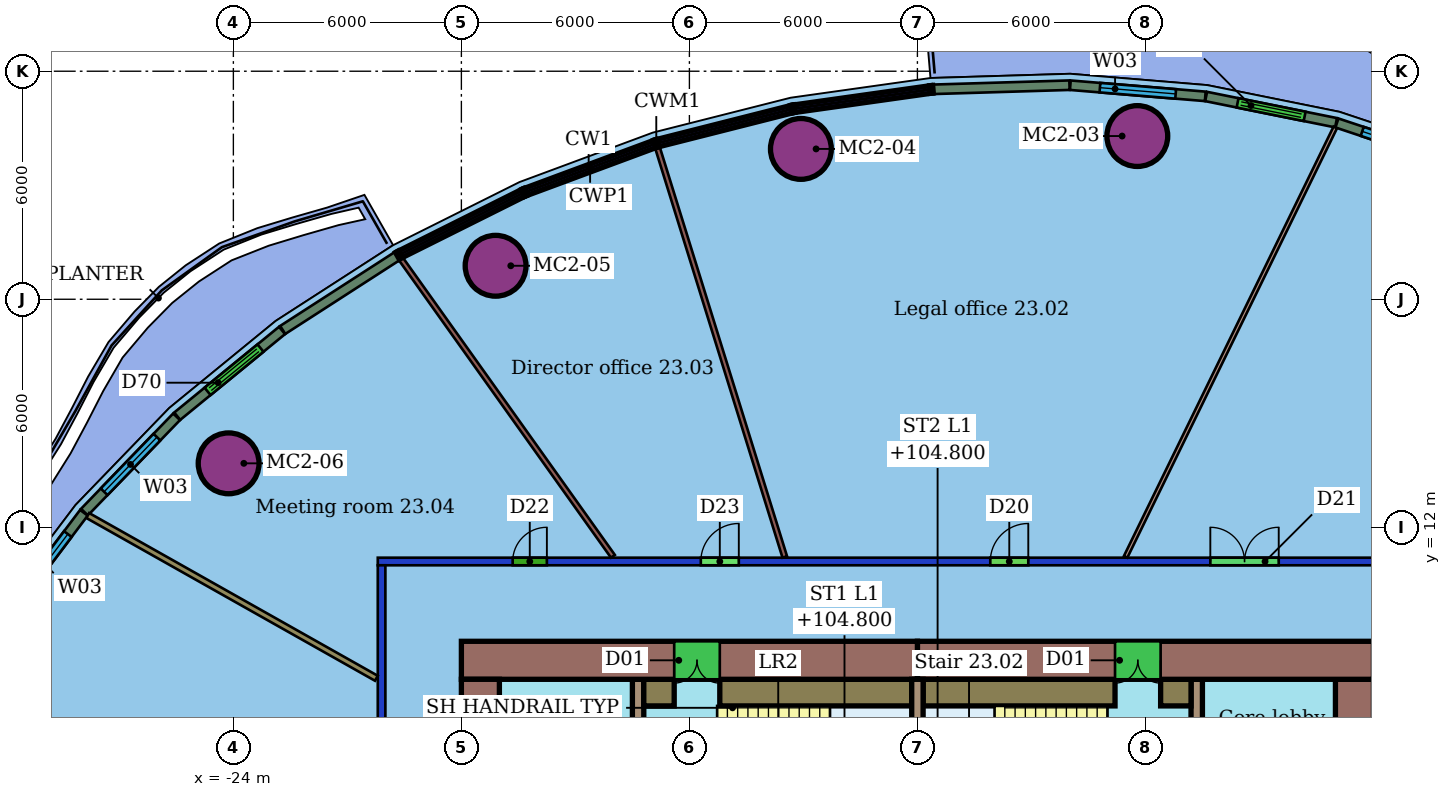
"""IFC4 building model, lengths in metres.
Left out: names, types, materials, properties, quantities, classifications, styles, units other than length and angle.
Written with IfcOpenShell. Run it as: python <this file> out.ifc"""

import sys

from ifc_helpers import new_model, si_unit, direction, frame, frame_2d, origin, origin_2d, place, context, subcontext, project, spatial, rectangle, hollow_circle, extrude, element, fill, save


model = new_model("IFC4")
c1 = context("Model", 3, precision=1e-05, world=origin(), true_north=direction((0.0, 1.0)))
c2 = subcontext(c1, "Body", "Model", "MODEL_VIEW")
j1 = project(units=[si_unit("LENGTHUNIT", "METRE"), si_unit("PLANEANGLEUNIT", "RADIAN")], contexts=[c1])
p1 = place(None, origin())
s1 = spatial("IfcSite", under=j1, at=p1, CompositionType="ELEMENT")
p2 = place(p1, origin())
s2 = spatial("IfcBuilding", under=s1, at=p2, CompositionType="ELEMENT")
p3 = place(p2, frame((0.0, 0.0, 103.0)))
s3 = spatial("IfcBuildingStorey", under=s2, at=p3, CompositionType="ELEMENT", Elevation=103.0)
for number, where, z_axis, x_axis in (
    (1, (-0.213, 22.294, 0.0), (0.0, 0.0, 1.0), (1.0, 0.0, 0.0)),
    (2, (-9.066, 21.956, 0.0), (0.0, 0.0, 1.0), (1.0, 0.0, 0.0)),
    (3, (-17.1, 18.881, 0.0), (0.0, 0.0, 1.0), (1.0, 0.0, 0.0)),
    (4, (-24.125, 13.683, 0.0), (0.0, 0.0, 1.0), (1.0, 0.0, 0.0)),
):
    element("IfcColumn", number, at=place(p3, frame(where, z_axis=z_axis, x_axis=x_axis)), inside=s3, PredefinedType="COLUMN", context=c2, shape_type="SweptSolid", body=[
        extrude(hollow_circle(Radius=0.8, WallThickness=0.055, at=origin_2d()), origin(), (0.0, 0.0, 1.0), 3.45),
    ])
p4 = place(p3, frame((-20.1, -11.0, 0.0), z_axis=(0.0, 0.0, 1.0), x_axis=(0.0, 1.0, 0.0)))
e5 = element("IfcWall", 5, at=p4, inside=s3, PredefinedType="PARTITIONING", context=c2, shape_type="SweptSolid", body=[
    extrude(rectangle(XDim=22.0, YDim=0.2, at=frame_2d((11.0, 0.0))), origin(), (0.0, 0.0, 1.0), 3.0),
])
p5 = place(p4, frame((15.485, 0.0, 0.0)))
e6 = element("IfcOpeningElement", 6, at=p5, cuts=e5, PredefinedType="OPENING", context=c2, shape_type="SweptSolid", body=[
    extrude(rectangle(XDim=1.5, YDim=2.1, at=frame_2d((0.75, 1.05))), frame((0.0, 0.11, 0.0), z_axis=(0.0, -1.0, 0.0), x_axis=(1.0, 0.0, 0.0)), (0.0, 0.0, 1.0), 0.22),
])
p6 = place(p4, frame((9.038, 0.0, 0.0)))
e7 = element("IfcOpeningElement", 7, at=p6, cuts=e5, PredefinedType="OPENING", context=c2, shape_type="SweptSolid", body=[
    extrude(rectangle(XDim=0.9, YDim=2.1, at=frame_2d((0.45, 1.05))), frame((0.0, 0.11, 0.0), z_axis=(0.0, -1.0, 0.0), x_axis=(1.0, 0.0, 0.0)), (0.0, 0.0, 1.0), 0.22),
])
p7 = place(p4, frame((4.808, 0.0, 0.0)))
e8 = element("IfcOpeningElement", 8, at=p7, cuts=e5, PredefinedType="OPENING", context=c2, shape_type="SweptSolid", body=[
    extrude(rectangle(XDim=1.0, YDim=2.1, at=frame_2d((0.5, 1.05))), frame((0.0, 0.11, 0.0), z_axis=(0.0, -1.0, 0.0), x_axis=(1.0, 0.0, 0.0)), (0.0, 0.0, 1.0), 0.22),
])
p8 = place(p3, frame((-20.2, 11.1, 0.0), z_axis=(0.0, 0.0, 1.0), x_axis=(1.0, 0.0, 0.0)))
e9 = element("IfcWall", 9, at=p8, inside=s3, PredefinedType="PARTITIONING", context=c2, shape_type="SweptSolid", body=[
    extrude(rectangle(XDim=28.4, YDim=0.2, at=frame_2d((14.2, 0.0))), origin(), (0.0, 0.0, 1.0), 3.0),
])
p9 = place(p8, frame((21.908, 0.0, 0.0)))
e10 = element("IfcOpeningElement", 10, at=p9, cuts=e9, PredefinedType="OPENING", context=c2, shape_type="SweptSolid", body=[
    extrude(rectangle(XDim=1.8, YDim=2.1, at=frame_2d((0.9, 1.05))), frame((0.0, 0.11, 0.0), z_axis=(0.0, -1.0, 0.0), x_axis=(1.0, 0.0, 0.0)), (0.0, 0.0, 1.0), 0.22),
])
p10 = place(p8, frame((16.118, 0.0, 0.0)))
e11 = element("IfcOpeningElement", 11, at=p10, cuts=e9, PredefinedType="OPENING", context=c2, shape_type="SweptSolid", body=[
    extrude(rectangle(XDim=1.0, YDim=2.1, at=frame_2d((0.5, 1.05))), frame((0.0, 0.11, 0.0), z_axis=(0.0, -1.0, 0.0), x_axis=(1.0, 0.0, 0.0)), (0.0, 0.0, 1.0), 0.22),
])
p11 = place(p8, frame((8.5, 0.0, 0.0)))
e12 = element("IfcOpeningElement", 12, at=p11, cuts=e9, PredefinedType="OPENING", context=c2, shape_type="SweptSolid", body=[
    extrude(rectangle(XDim=1.0, YDim=2.4, at=frame_2d((0.5, 1.2))), frame((0.0, 0.11, 0.0), z_axis=(0.0, -1.0, 0.0), x_axis=(1.0, 0.0, 0.0)), (0.0, 0.0, 1.0), 0.22),
])
p12 = place(p8, frame((3.55, 0.0, 0.0)))
e13 = element("IfcOpeningElement", 13, at=p12, cuts=e9, PredefinedType="OPENING", context=c2, shape_type="SweptSolid", body=[
    extrude(rectangle(XDim=0.9, YDim=2.1, at=frame_2d((0.45, 1.05))), frame((0.0, 0.11, 0.0), z_axis=(0.0, -1.0, 0.0), x_axis=(1.0, 0.0, 0.0)), (0.0, 0.0, 1.0), 0.22),
])
p13 = place(p3, frame((4.996, 22.521, 0.0), z_axis=(0.0, 0.0, 1.0), x_axis=(-0.438736131728, -0.898615939496, 0.0)))
e14 = element("IfcWall", 14, at=p13, inside=s3, PredefinedType="PARTITIONING", context=c2, shape_type="SweptSolid", body=[
    extrude(rectangle(XDim=12.574, YDim=0.1, at=frame_2d((6.287, 0.0))), origin(), (0.0, 0.0, 1.0), 3.45),
])
p14 = place(p3, frame((-12.837, 21.979, 0.0), z_axis=(0.0, 0.0, 1.0), x_axis=(0.29704241039, -0.954864286917, 0.0)))
e15 = element("IfcWall", 15, at=p14, inside=s3, PredefinedType="PARTITIONING", context=c2, shape_type="SweptSolid", body=[
    extrude(rectangle(XDim=11.269, YDim=0.125, at=frame_2d((5.635, 0.0))), origin(), (0.0, 0.0, 1.0), 3.45),
])
p15 = place(p3, frame((-19.586, 19.053, 0.0), z_axis=(0.0, 0.0, 1.0), x_axis=(0.580586141234, -0.814198828669, 0.0)))
e16 = element("IfcWall", 16, at=p15, inside=s3, PredefinedType="PARTITIONING", context=c2, shape_type="SweptSolid", body=[
    extrude(rectangle(XDim=9.601, YDim=0.125, at=frame_2d((4.801, 0.0))), origin(), (0.0, 0.0, 1.0), 3.45),
])
p16 = place(p3, frame((-27.831, 12.31, 0.0), z_axis=(0.0, 0.0, 1.0), x_axis=(0.871068786754, -0.491161041556, 0.0)))
e17 = element("IfcWall", 17, at=p16, inside=s3, PredefinedType="PARTITIONING", context=c2, shape_type="SweptSolid", body=[
    extrude(rectangle(XDim=8.719, YDim=0.15, at=frame_2d((4.359, 0.0))), origin(), (0.0, 0.0, 1.0), 3.45),
])
p17 = place(p3, frame((8.268, 21.563, 0.0), z_axis=(0.0, 0.0, 1.0), x_axis=(-0.948762176605, 0.315991031903, 0.0)))
e18 = element("IfcWall", 18, at=p17, inside=s3, PredefinedType="SOLIDWALL", context=c2, shape_type="SweptSolid", body=[
    extrude(rectangle(XDim=3.403, YDim=0.25, at=frame_2d((1.702, 0.0))), origin(), (0.0, 0.0, 1.0), 3.05),
])
p18 = place(p17, frame((0.702, 0.0, 0.9)))
e19 = element("IfcOpeningElement", 19, at=p18, cuts=e18, PredefinedType="OPENING", context=c2, shape_type="SweptSolid", body=[
    extrude(rectangle(XDim=2.0, YDim=2.1, at=frame_2d((1.0, 1.05))), frame((0.0, 0.135, 0.0), z_axis=(0.0, -1.0, 0.0), x_axis=(1.0, 0.0, 0.0)), (0.0, 0.0, 1.0), 0.27),
])
p19 = place(p3, frame((5.017, 22.645, 0.0), z_axis=(0.0, 0.0, 1.0), x_axis=(-0.980191158743, 0.198053761191, 0.0)))
e20 = element("IfcWall", 20, at=p19, inside=s3, PredefinedType="SOLIDWALL", context=c2, shape_type="SweptSolid", body=[
    extrude(rectangle(XDim=3.489, YDim=0.25, at=frame_2d((1.744, 0.0))), origin(), (0.0, 0.0, 1.0), 3.05),
])
p20 = place(p19, frame((0.844, 0.0, 0.0)))
e21 = element("IfcOpeningElement", 21, at=p20, cuts=e20, PredefinedType="OPENING", context=c2, shape_type="SweptSolid", body=[
    extrude(rectangle(XDim=1.8, YDim=2.4, at=frame_2d((0.9, 1.2))), frame((0.0, 0.135, 0.0), z_axis=(0.0, -1.0, 0.0), x_axis=(1.0, 0.0, 0.0)), (0.0, 0.0, 1.0), 0.27),
])
p21 = place(p3, frame((1.575, 23.339, 0.0), z_axis=(0.0, 0.0, 1.0), x_axis=(-0.996602699612, 0.082359329318, 0.0)))
e22 = element("IfcWall", 22, at=p21, inside=s3, PredefinedType="SOLIDWALL", context=c2, shape_type="SweptSolid", body=[
    extrude(rectangle(XDim=3.563, YDim=0.25, at=frame_2d((1.782, 0.0))), origin(), (0.0, 0.0, 1.0), 3.05),
])
p22 = place(p21, frame((0.781, 0.0, 0.9)))
e23 = element("IfcOpeningElement", 23, at=p22, cuts=e22, PredefinedType="OPENING", context=c2, shape_type="SweptSolid", body=[
    extrude(rectangle(XDim=2.0, YDim=2.1, at=frame_2d((1.0, 1.05))), frame((0.0, 0.135, 0.0), z_axis=(0.0, -1.0, 0.0), x_axis=(1.0, 0.0, 0.0)), (0.0, 0.0, 1.0), 0.27),
])
p23 = place(p3, frame((-1.998, 23.633, 0.0), z_axis=(0.0, 0.0, 1.0), x_axis=(-0.999541179145, -0.030289126641, 0.0)))
e24 = element("IfcWall", 24, at=p23, inside=s3, PredefinedType="SOLIDWALL", context=c2, shape_type="SweptSolid", body=[
    extrude(rectangle(XDim=3.579, YDim=0.25, at=frame_2d((1.79, 0.0))), origin(), (0.0, 0.0, 1.0), 3.05),
])
p24 = place(p3, frame((-19.694, 19.132, 0.0), z_axis=(0.0, 0.0, 1.0), x_axis=(-0.840361806694, -0.542025860869, 0.0)))
e25 = element("IfcWall", 25, at=p24, inside=s3, PredefinedType="SOLIDWALL", context=c2, shape_type="SweptSolid", body=[
    extrude(rectangle(XDim=3.579, YDim=0.25, at=frame_2d((1.789, 0.0))), origin(), (0.0, 0.0, 1.0), 3.05),
])
p25 = place(p3, frame((-22.719, 17.179, 0.0), z_axis=(0.0, 0.0, 1.0), x_axis=(-0.774030565645, -0.633148231813, 0.0)))
e26 = element("IfcWall", 26, at=p25, inside=s3, PredefinedType="SOLIDWALL", context=c2, shape_type="SweptSolid", body=[
    extrude(rectangle(XDim=3.563, YDim=0.25, at=frame_2d((1.781, 0.0))), origin(), (0.0, 0.0, 1.0), 3.05),
])
p26 = place(p25, frame((0.732, 0.0, 0.0)))
e27 = element("IfcOpeningElement", 27, at=p26, cuts=e26, PredefinedType="OPENING", context=c2, shape_type="SweptSolid", body=[
    extrude(rectangle(XDim=1.8, YDim=2.4, at=frame_2d((0.9, 1.2))), frame((0.0, 0.135, 0.0), z_axis=(0.0, -1.0, 0.0), x_axis=(1.0, 0.0, 0.0)), (0.0, 0.0, 1.0), 0.27),
])
p27 = place(p3, frame((-25.494, 14.908, 0.0), z_axis=(0.0, 0.0, 1.0), x_axis=(-0.694896677822, -0.719109593283, 0.0)))
e28 = element("IfcWall", 28, at=p27, inside=s3, PredefinedType="SOLIDWALL", context=c2, shape_type="SweptSolid", body=[
    extrude(rectangle(XDim=3.489, YDim=0.25, at=frame_2d((1.744, 0.0))), origin(), (0.0, 0.0, 1.0), 3.05),
])
p28 = place(p27, frame((0.744, 0.0, 0.9)))
e29 = element("IfcOpeningElement", 29, at=p28, cuts=e28, PredefinedType="OPENING", context=c2, shape_type="SweptSolid", body=[
    extrude(rectangle(XDim=2.0, YDim=2.1, at=frame_2d((1.0, 1.05))), frame((0.0, 0.135, 0.0), z_axis=(0.0, -1.0, 0.0), x_axis=(1.0, 0.0, 0.0)), (0.0, 0.0, 1.0), 0.27),
])
p29 = place(p3, frame((-27.933, 12.382, 0.0), z_axis=(0.0, 0.0, 1.0), x_axis=(-0.602098174714, -0.798422061322, 0.0)))
e30 = element("IfcWall", 30, at=p29, inside=s3, PredefinedType="SOLIDWALL", context=c2, shape_type="SweptSolid", body=[
    extrude(rectangle(XDim=3.404, YDim=0.25, at=frame_2d((1.702, 0.0))), origin(), (0.0, 0.0, 1.0), 3.05),
])
p30 = place(p29, frame((0.702, 0.0, 0.9)))
e31 = element("IfcOpeningElement", 31, at=p30, cuts=e30, PredefinedType="OPENING", context=c2, shape_type="SweptSolid", body=[
    extrude(rectangle(XDim=2.0, YDim=2.1, at=frame_2d((1.0, 1.05))), frame((0.0, 0.135, 0.0), z_axis=(0.0, -1.0, 0.0), x_axis=(1.0, 0.0, 0.0)), (0.0, 0.0, 1.0), 0.27),
])
p31 = place(p3, frame((6.0, 8.5, 0.0), z_axis=(0.0, 0.0, 1.0), x_axis=(-1.0, 0.0, 0.0)))
e32 = element("IfcWall", 32, at=p31, inside=s3, PredefinedType="SHEAR", context=c2, shape_type="SweptSolid", body=[
    extrude(rectangle(XDim=12.0, YDim=1.0, at=frame_2d((6.0, 0.0))), origin(), (0.0, 0.0, 1.0), 3.3),
])
p32 = place(p31, frame((5.6, 0.0, 0.0)))
e33 = element("IfcOpeningElement", 33, at=p32, cuts=e32, PredefinedType="OPENING", context=c2, shape_type="SweptSolid", body=[
    extrude(rectangle(XDim=1.2, YDim=2.1, at=frame_2d((0.6, 1.05))), frame((0.0, 0.51, 0.0), z_axis=(0.0, -1.0, 0.0), x_axis=(1.0, 0.0, 0.0)), (0.0, 0.0, 1.0), 1.02),
])
p33 = place(p3, frame((-6.0, 8.5, 0.0), z_axis=(0.0, 0.0, 1.0), x_axis=(-1.0, 0.0, 0.0)))
e34 = element("IfcWall", 34, at=p33, inside=s3, PredefinedType="SHEAR", context=c2, shape_type="SweptSolid", body=[
    extrude(rectangle(XDim=12.0, YDim=1.0, at=frame_2d((6.0, 0.0))), origin(), (0.0, 0.0, 1.0), 3.3),
])
p34 = place(p33, frame((5.2, 0.0, 0.0)))
e35 = element("IfcOpeningElement", 35, at=p34, cuts=e34, PredefinedType="OPENING", context=c2, shape_type="SweptSolid", body=[
    extrude(rectangle(XDim=1.2, YDim=2.1, at=frame_2d((0.6, 1.05))), frame((0.0, 0.51, 0.0), z_axis=(0.0, -1.0, 0.0), x_axis=(1.0, 0.0, 0.0)), (0.0, 0.0, 1.0), 1.02),
])
p35 = place(p3, frame((-17.5, 8.0, 0.0), z_axis=(0.0, 0.0, 1.0), x_axis=(0.0, -1.0, 0.0)))
e36 = element("IfcWall", 36, at=p35, inside=s3, PredefinedType="SHEAR", context=c2, shape_type="SweptSolid", body=[
    extrude(rectangle(XDim=16.0, YDim=1.0, at=frame_2d((8.0, 0.0))), origin(), (0.0, 0.0, 1.0), 3.3),
])
p36 = place(p35, frame((11.9, 0.0, 0.0)))
e37 = element("IfcOpeningElement", 37, at=p36, cuts=e36, PredefinedType="OPENING", context=c2, shape_type="SweptSolid", body=[
    extrude(rectangle(XDim=1.2, YDim=2.1, at=frame_2d((0.6, 1.05))), frame((0.0, 0.51, 0.0), z_axis=(0.0, -1.0, 0.0), x_axis=(1.0, 0.0, 0.0)), (0.0, 0.0, 1.0), 1.02),
])
p37 = place(p35, frame((2.9, 0.0, 0.0)))
e38 = element("IfcOpeningElement", 38, at=p37, cuts=e36, PredefinedType="OPENING", context=c2, shape_type="SweptSolid", body=[
    extrude(rectangle(XDim=1.2, YDim=2.1, at=frame_2d((0.6, 1.05))), frame((0.0, 0.51, 0.0), z_axis=(0.0, -1.0, 0.0), x_axis=(1.0, 0.0, 0.0)), (0.0, 0.0, 1.0), 1.02),
])
p38 = place(p3, frame((5.5, -8.0, 0.0), z_axis=(0.0, 0.0, 1.0), x_axis=(0.0, 1.0, 0.0)))
e39 = element("IfcWall", 39, at=p38, inside=s3, PredefinedType="SHEAR", context=c2, shape_type="SweptSolid", body=[
    extrude(rectangle(XDim=16.0, YDim=1.0, at=frame_2d((8.0, 0.0))), origin(), (0.0, 0.0, 1.0), 3.3),
])
p39 = place(p38, frame((2.9, 0.0, 0.0)))
e40 = element("IfcOpeningElement", 40, at=p39, cuts=e39, PredefinedType="OPENING", context=c2, shape_type="SweptSolid", body=[
    extrude(rectangle(XDim=1.2, YDim=2.1, at=frame_2d((0.6, 1.05))), frame((0.0, 0.51, 0.0), z_axis=(0.0, -1.0, 0.0), x_axis=(1.0, 0.0, 0.0)), (0.0, 0.0, 1.0), 1.02),
])
p40 = place(p38, frame((11.9, 0.0, 0.0)))
e41 = element("IfcOpeningElement", 41, at=p40, cuts=e39, PredefinedType="OPENING", context=c2, shape_type="SweptSolid", body=[
    extrude(rectangle(XDim=1.2, YDim=2.1, at=frame_2d((0.6, 1.05))), frame((0.0, 0.51, 0.0), z_axis=(0.0, -1.0, 0.0), x_axis=(1.0, 0.0, 0.0)), (0.0, 0.0, 1.0), 1.02),
])
p41 = place(p3, frame((-13.35, 8.0, 0.0), z_axis=(0.0, 0.0, 1.0), x_axis=(0.0, -1.0, 0.0)))
e42 = element("IfcWall", 42, at=p41, inside=s3, PredefinedType="SHEAR", context=c2, shape_type="SweptSolid", body=[
    extrude(rectangle(XDim=16.0, YDim=0.3, at=frame_2d((8.0, 0.0))), origin(), (0.0, 0.0, 1.0), 3.3),
])
p42 = place(p41, frame((7.25, 0.0, 0.0)))
e43 = element("IfcOpeningElement", 43, at=p42, cuts=e42, PredefinedType="OPENING", context=c2, shape_type="SweptSolid", body=[
    extrude(rectangle(XDim=1.5, YDim=2.1, at=frame_2d((0.75, 1.05))), frame((0.0, 0.16, 0.0), z_axis=(0.0, -1.0, 0.0), x_axis=(1.0, 0.0, 0.0)), (0.0, 0.0, 1.0), 0.32),
])
p43 = place(p3, frame((1.35, -8.0, 0.0), z_axis=(0.0, 0.0, 1.0), x_axis=(0.0, 1.0, 0.0)))
e44 = element("IfcWall", 44, at=p43, inside=s3, PredefinedType="SHEAR", context=c2, shape_type="SweptSolid", body=[
    extrude(rectangle(XDim=16.0, YDim=0.3, at=frame_2d((8.0, 0.0))), origin(), (0.0, 0.0, 1.0), 3.3),
])
p44 = place(p43, frame((1.91, 0.0, 0.0)))
e45 = element("IfcOpeningElement", 45, at=p44, cuts=e44, PredefinedType="OPENING", context=c2, shape_type="SweptSolid", body=[
    extrude(rectangle(XDim=1.0, YDim=2.1, at=frame_2d((0.5, 1.05))), frame((0.0, 0.16, 0.0), z_axis=(0.0, -1.0, 0.0), x_axis=(1.0, 0.0, 0.0)), (0.0, 0.0, 1.0), 0.32),
])
p45 = place(p43, frame((7.25, 0.0, 0.0)))
e46 = element("IfcOpeningElement", 46, at=p45, cuts=e44, PredefinedType="OPENING", context=c2, shape_type="SweptSolid", body=[
    extrude(rectangle(XDim=1.5, YDim=2.1, at=frame_2d((0.75, 1.05))), frame((0.0, 0.16, 0.0), z_axis=(0.0, -1.0, 0.0), x_axis=(1.0, 0.0, 0.0)), (0.0, 0.0, 1.0), 0.32),
])
p46 = place(p3, frame((-6.0, 3.88, 0.0), z_axis=(0.0, 0.0, 1.0), x_axis=(0.0, 1.0, 0.0)))
e47 = element("IfcWall", 47, at=p46, inside=s3, PredefinedType="SHEAR", context=c2, shape_type="SweptSolid", body=[
    extrude(rectangle(XDim=4.12, YDim=0.3, at=frame_2d((2.06, 0.0))), origin(), (0.0, 0.0, 1.0), 3.3),
])
p47 = place(p3, frame((-13.2, 7.65, 0.0), z_axis=(0.0, 0.0, 1.0), x_axis=(1.0, 0.0, 0.0)))
e48 = element("IfcWall", 48, at=p47, inside=s3, PredefinedType="SHEAR", context=c2, shape_type="SweptSolid", body=[
    extrude(rectangle(XDim=0.8, YDim=0.7, at=frame_2d((0.4, 0.0))), origin(), (0.0, 0.0, 1.0), 3.3),
])
for number, where, z_axis, x_axis in (
    (49, (-11.2, 7.65, 0.0), (0.0, 0.0, 1.0), (1.0, 0.0, 0.0)),
    (50, (-5.85, 7.65, 0.0), (0.0, 0.0, 1.0), (1.0, 0.0, 0.0)),
):
    element("IfcWall", number, at=place(p3, frame(where, z_axis=z_axis, x_axis=x_axis)), inside=s3, PredefinedType="SHEAR", context=c2, shape_type="SweptSolid", body=[
        extrude(rectangle(XDim=5.05, YDim=0.7, at=frame_2d((2.525, 0.0))), origin(), (0.0, 0.0, 1.0), 3.3),
    ])
p48 = place(p3, frame((0.4, 7.65, 0.0), z_axis=(0.0, 0.0, 1.0), x_axis=(1.0, 0.0, 0.0)))
e51 = element("IfcWall", 51, at=p48, inside=s3, PredefinedType="SHEAR", context=c2, shape_type="SweptSolid", body=[
    extrude(rectangle(XDim=0.8, YDim=0.7, at=frame_2d((0.4, 0.0))), origin(), (0.0, 0.0, 1.0), 3.3),
])
p49 = place(p9, origin())
e52 = element("IfcDoor", 52, at=p49, inside=s3, OperationType="DOUBLE_DOOR_SINGLE_SWING", PredefinedType="DOOR", context=c2, shape_type="SweptSolid", body=[
    extrude(rectangle(XDim=1.8, YDim=2.1, at=frame_2d((0.9, 1.05))), frame((0.0, 0.025, 0.0), z_axis=(0.0, -1.0, 0.0), x_axis=(1.0, 0.0, 0.0)), (0.0, 0.0, 1.0), 0.05),
])
fill(e10, e52)
p50 = place(p10, origin())
e53 = element("IfcDoor", 53, at=p50, inside=s3, OperationType="SINGLE_SWING_RIGHT", PredefinedType="DOOR", context=c2, shape_type="SweptSolid", body=[
    extrude(rectangle(XDim=1.0, YDim=2.1, at=frame_2d((0.5, 1.05))), frame((0.0, 0.025, 0.0), z_axis=(0.0, -1.0, 0.0), x_axis=(1.0, 0.0, 0.0)), (0.0, 0.0, 1.0), 0.05),
])
fill(e11, e53)
p51 = place(p11, origin())
e54 = element("IfcDoor", 54, at=p51, inside=s3, OperationType="SINGLE_SWING_RIGHT", PredefinedType="DOOR", context=c2, shape_type="SweptSolid", body=[
    extrude(rectangle(XDim=1.0, YDim=2.4, at=frame_2d((0.5, 1.2))), frame((0.0, 0.025, 0.0), z_axis=(0.0, -1.0, 0.0), x_axis=(1.0, 0.0, 0.0)), (0.0, 0.0, 1.0), 0.05),
])
fill(e12, e54)
p52 = place(p12, origin())
e55 = element("IfcDoor", 55, at=p52, inside=s3, OperationType="SINGLE_SWING_RIGHT", PredefinedType="DOOR", context=c2, shape_type="SweptSolid", body=[
    extrude(rectangle(XDim=0.9, YDim=2.1, at=frame_2d((0.45, 1.05))), frame((0.0, 0.025, 0.0), z_axis=(0.0, -1.0, 0.0), x_axis=(1.0, 0.0, 0.0)), (0.0, 0.0, 1.0), 0.05),
])
fill(e13, e55)
p53 = place(p18, origin())
e56 = element("IfcWindow", 56, at=p53, inside=s3, PartitioningType="SINGLE_PANEL", PredefinedType="WINDOW", context=c2, shape_type="SweptSolid", body=[
    extrude(rectangle(XDim=2.0, YDim=2.1, at=frame_2d((1.0, 1.05))), frame((0.0, 0.03, 0.0), z_axis=(0.0, -1.0, 0.0), x_axis=(1.0, 0.0, 0.0)), (0.0, 0.0, 1.0), 0.06),
])
fill(e19, e56)
p54 = place(p20, origin())
e57 = element("IfcDoor", 57, at=p54, inside=s3, OperationType="DOUBLE_DOOR_SLIDING", PredefinedType="DOOR", context=c2, shape_type="SweptSolid", body=[
    extrude(rectangle(XDim=1.8, YDim=2.4, at=frame_2d((0.9, 1.2))), frame((0.0, 0.025, 0.0), z_axis=(0.0, -1.0, 0.0), x_axis=(1.0, 0.0, 0.0)), (0.0, 0.0, 1.0), 0.05),
])
fill(e21, e57)
p55 = place(p22, origin())
e58 = element("IfcWindow", 58, at=p55, inside=s3, PartitioningType="SINGLE_PANEL", PredefinedType="WINDOW", context=c2, shape_type="SweptSolid", body=[
    extrude(rectangle(XDim=2.0, YDim=2.1, at=frame_2d((1.0, 1.05))), frame((0.0, 0.03, 0.0), z_axis=(0.0, -1.0, 0.0), x_axis=(1.0, 0.0, 0.0)), (0.0, 0.0, 1.0), 0.06),
])
fill(e23, e58)
p56 = place(p26, origin())
e59 = element("IfcDoor", 59, at=p56, inside=s3, OperationType="DOUBLE_DOOR_SLIDING", PredefinedType="DOOR", context=c2, shape_type="SweptSolid", body=[
    extrude(rectangle(XDim=1.8, YDim=2.4, at=frame_2d((0.9, 1.2))), frame((0.0, 0.025, 0.0), z_axis=(0.0, -1.0, 0.0), x_axis=(1.0, 0.0, 0.0)), (0.0, 0.0, 1.0), 0.05),
])
fill(e27, e59)
p57 = place(p28, origin())
e60 = element("IfcWindow", 60, at=p57, inside=s3, PartitioningType="SINGLE_PANEL", PredefinedType="WINDOW", context=c2, shape_type="SweptSolid", body=[
    extrude(rectangle(XDim=2.0, YDim=2.1, at=frame_2d((1.0, 1.05))), frame((0.0, 0.03, 0.0), z_axis=(0.0, -1.0, 0.0), x_axis=(1.0, 0.0, 0.0)), (0.0, 0.0, 1.0), 0.06),
])
fill(e29, e60)
p58 = place(p30, origin())
e61 = element("IfcWindow", 61, at=p58, inside=s3, PartitioningType="SINGLE_PANEL", PredefinedType="WINDOW", context=c2, shape_type="SweptSolid", body=[
    extrude(rectangle(XDim=2.0, YDim=2.1, at=frame_2d((1.0, 1.05))), frame((0.0, 0.03, 0.0), z_axis=(0.0, -1.0, 0.0), x_axis=(1.0, 0.0, 0.0)), (0.0, 0.0, 1.0), 0.06),
])
fill(e31, e61)
p59 = place(p32, origin())
e62 = element("IfcDoor", 62, at=p59, inside=s3, OperationType="DOUBLE_DOOR_SINGLE_SWING", PredefinedType="NOTDEFINED", context=c2, shape_type="SweptSolid", body=[
    extrude(rectangle(XDim=1.2, YDim=2.1, at=frame_2d((0.6, 1.05))), frame((0.0, 0.025, 0.0), z_axis=(0.0, -1.0, 0.0), x_axis=(1.0, 0.0, 0.0)), (0.0, 0.0, 1.0), 0.05),
])
fill(e33, e62)
p60 = place(p34, origin())
e63 = element("IfcDoor", 63, at=p60, inside=s3, OperationType="DOUBLE_DOOR_SINGLE_SWING", PredefinedType="NOTDEFINED", context=c2, shape_type="SweptSolid", body=[
    extrude(rectangle(XDim=1.2, YDim=2.1, at=frame_2d((0.6, 1.05))), frame((0.0, 0.025, 0.0), z_axis=(0.0, -1.0, 0.0), x_axis=(1.0, 0.0, 0.0)), (0.0, 0.0, 1.0), 0.05),
])
fill(e35, e63)
save(model, sys.argv[1])
